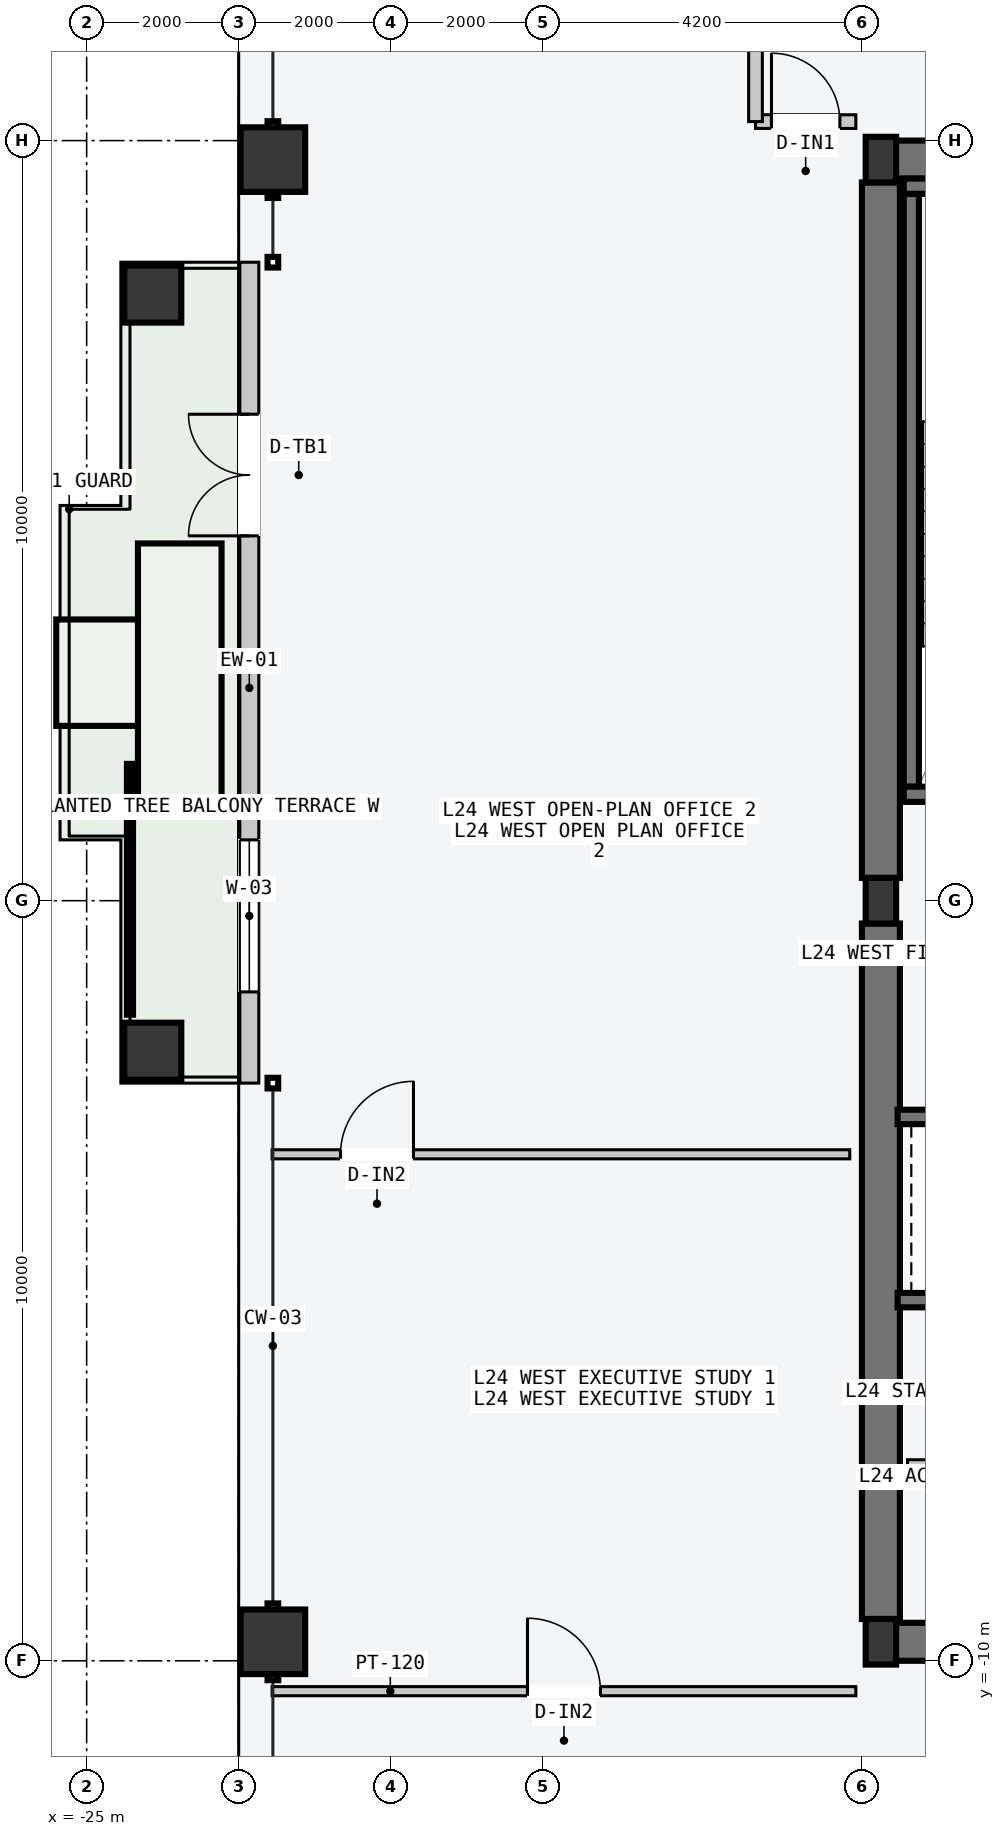
"""IFC4 building model, lengths in metres.
Left out: names, types, materials, properties, quantities, classifications, styles, units other than length and angle.
Written with IfcOpenShell. Run it as: python <this file> out.ifc"""

import sys

from ifc_helpers import new_model, si_unit, direction, frame, frame_2d, origin, origin_2d, place, context, subcontext, project, spatial, rectangle, hollow_rectangle, i_section, extrude, element, fill, save


model = new_model("IFC4")
c1 = context("Model", 3, precision=1e-05, world=origin(), true_north=direction((0.0, 1.0)))
c2 = subcontext(c1, "Body", "Model", "MODEL_VIEW")
j1 = project(units=[si_unit("LENGTHUNIT", "METRE"), si_unit("PLANEANGLEUNIT", "RADIAN")], contexts=[c1])
p1 = place(None, origin())
s1 = spatial("IfcSite", under=j1, at=p1, CompositionType="ELEMENT")
p2 = place(p1, origin())
s2 = spatial("IfcBuilding", under=s1, at=p2, CompositionType="ELEMENT")
p3 = place(p2, frame((0.0, 0.0, 95.4)))
s3 = spatial("IfcBuildingStorey", under=s2, at=p3, CompositionType="ELEMENT", Elevation=95.4)
for number, where, z_axis, x_axis in (
    (1, (-14.53, -9.75, -0.2), (0.0, 0.0, 1.0), (1.0, 0.0, 0.0)),
    (2, (-14.53, 9.75, -0.2), (0.0, 0.0, 1.0), (1.0, 0.0, 0.0)),
):
    element("IfcWall", number, at=place(p3, frame(where, z_axis=z_axis, x_axis=x_axis)), inside=s3, PredefinedType="SHEAR", context=c2, shape_type="SweptSolid", body=[
        extrude(rectangle(XDim=6.46, YDim=0.5, at=frame_2d((3.23, 0.0))), origin(), (0.0, 0.0, 1.0), 3.6),
    ])
for number, where, z_axis, x_axis in (
    (3, (-14.55, -9.45, -0.2), (0.0, 0.0, 1.0), (0.0, 1.0, 0.0)),
    (4, (-14.55, 0.3, -0.2), (0.0, 0.0, 1.0), (0.0, 1.0, 0.0)),
):
    element("IfcWall", number, at=place(p3, frame(where, z_axis=z_axis, x_axis=x_axis)), inside=s3, PredefinedType="SHEAR", context=c2, shape_type="SweptSolid", body=[
        extrude(rectangle(XDim=9.15, YDim=0.5, at=frame_2d((4.575, 0.0))), origin(), (0.0, 0.0, 1.0), 3.6),
    ])
p4 = place(p3, frame((-14.15, 1.5, -0.2), z_axis=(0.0, 0.0, 1.0), x_axis=(0.0, 1.0, 0.0)))
e5 = element("IfcWall", 5, at=p4, inside=s3, PredefinedType="SOLIDWALL", context=c2, shape_type="SweptSolid", body=[
    extrude(rectangle(XDim=7.8, YDim=0.2, at=frame_2d((3.9, 0.0))), origin(), (0.0, 0.0, 1.0), 3.6),
])
p5 = place(p3, frame((-14.25, 1.4, -0.2), z_axis=(0.0, 0.0, 1.0), x_axis=(1.0, 0.0, 0.0)))
e6 = element("IfcWall", 6, at=p5, inside=s3, PredefinedType="SOLIDWALL", context=c2, shape_type="SweptSolid", body=[
    extrude(rectangle(XDim=3.72, YDim=0.2, at=frame_2d((1.86, 0.0))), origin(), (0.0, 0.0, 1.0), 3.6),
])
p6 = place(p5, frame((1.5, 0.0, 0.2)))
e7 = element("IfcOpeningElement", 7, at=p6, cuts=e6, PredefinedType="OPENING", context=c2, shape_type="SweptSolid", body=[
    extrude(rectangle(XDim=1.12, YDim=2.18, at=frame_2d((0.56, 1.09))), frame((0.0, 0.11, 0.0), z_axis=(0.0, -1.0, 0.0), x_axis=(1.0, 0.0, 0.0)), (0.0, 0.0, 1.0), 0.22),
])
p7 = place(p3, frame((-14.25, 9.4, -0.2), z_axis=(0.0, 0.0, 1.0), x_axis=(1.0, 0.0, 0.0)))
e8 = element("IfcWall", 8, at=p7, inside=s3, PredefinedType="SOLIDWALL", context=c2, shape_type="SweptSolid", body=[
    extrude(rectangle(XDim=3.72, YDim=0.2, at=frame_2d((1.86, 0.0))), origin(), (0.0, 0.0, 1.0), 3.6),
])
for number, where, z_axis, x_axis in (
    (9, (-14.55, -9.75, 0.0), (0.0, 0.0, 1.0), (1.0, 0.0, 0.0)),
    (10, (-14.55, 0.0, 0.0), (0.0, 0.0, 1.0), (1.0, 0.0, 0.0)),
    (11, (-14.55, 9.75, 0.0), (0.0, 0.0, 1.0), (1.0, 0.0, 0.0)),
):
    element("IfcColumn", number, at=place(p3, frame(where, z_axis=z_axis, x_axis=x_axis)), inside=s3, PredefinedType="COLUMN", context=c2, shape_type="SweptSolid", body=[
        extrude(i_section(OverallWidth=0.4, OverallDepth=0.6, WebThickness=0.022, FlangeThickness=0.036, at=origin_2d()), origin(), (0.0, 0.0, 1.0), 3.6),
    ])
for number, where, z_axis, x_axis in (
    (12, (-22.55, -9.75, 0.0), (0.0, 0.0, 1.0), (0.0, 1.0, 0.0)),
    (13, (-22.55, 9.75, 0.0), (0.0, 0.0, 1.0), (0.0, 1.0, 0.0)),
):
    element("IfcColumn", number, at=place(p3, frame(where, z_axis=z_axis, x_axis=x_axis)), inside=s3, PredefinedType="COLUMN", context=c2, shape_type="SweptSolid", body=[
        extrude(hollow_rectangle(XDim=0.85, YDim=0.85, WallThickness=0.04, at=origin_2d()), origin(), (0.0, 0.0, 1.0), 3.6),
    ])
for number, where, z_axis, x_axis in (
    (14, (-24.13, -1.98, -0.2), (0.0, 0.0, 1.0), (0.0, 1.0, 0.0)),
    (15, (-24.13, 7.98, -0.2), (0.0, 0.0, 1.0), (0.0, 1.0, 0.0)),
):
    element("IfcColumn", number, at=place(p3, frame(where, z_axis=z_axis, x_axis=x_axis)), inside=s3, PredefinedType="COLUMN", context=c2, shape_type="SweptSolid", body=[
        extrude(hollow_rectangle(XDim=0.75, YDim=0.75, WallThickness=0.032, at=origin_2d()), origin(), (0.0, 0.0, 1.0), 3.8),
    ])
p8 = place(p3, frame((-22.86, -2.4, 0.0), z_axis=(0.0, 0.0, 1.0), x_axis=(0.0, 1.0, 0.0)))
e16 = element("IfcWall", 16, at=p8, inside=s3, PredefinedType="STANDARD", context=c2, shape_type="SweptSolid", body=[
    extrude(rectangle(XDim=10.8, YDim=0.25, at=frame_2d((5.4, 0.0))), origin(), (0.0, 0.0, 1.0), 3.4),
])
p9 = place(p8, frame((7.2, 0.0, 0.0)))
e17 = element("IfcOpeningElement", 17, at=p9, cuts=e16, PredefinedType="OPENING", context=c2, shape_type="SweptSolid", body=[
    extrude(rectangle(XDim=1.6, YDim=2.2, at=frame_2d((0.8, 1.1))), frame((0.0, 0.135, 0.0), z_axis=(0.0, -1.0, 0.0), x_axis=(1.0, 0.0, 0.0)), (0.0, 0.0, 1.0), 0.27),
])
p10 = place(p8, frame((1.2, 0.0, 0.85)))
e18 = element("IfcOpeningElement", 18, at=p10, cuts=e16, PredefinedType="OPENING", context=c2, shape_type="SweptSolid", body=[
    extrude(rectangle(XDim=2.0, YDim=2.1, at=frame_2d((1.0, 1.05))), frame((0.0, 0.135, 0.0), z_axis=(0.0, -1.0, 0.0), x_axis=(1.0, 0.0, 0.0)), (0.0, 0.0, 1.0), 0.27),
])
p11 = place(p3, frame((-14.33, -2.845, -0.2), z_axis=(0.0, 0.0, 1.0), x_axis=(1.0, 0.0, 0.0)))
e19 = element("IfcWall", 19, at=p11, inside=s3, PredefinedType="SOLIDWALL", context=c2, shape_type="SweptSolid", body=[
    extrude(rectangle(XDim=2.68, YDim=0.19, at=frame_2d((1.34, 0.0))), origin(), (0.0, 0.0, 1.0), 3.6),
])
p12 = place(p11, frame((0.83, 0.0, 0.2)))
e20 = element("IfcOpeningElement", 20, at=p12, cuts=e19, PredefinedType="OPENING", context=c2, shape_type="SweptSolid", body=[
    extrude(rectangle(XDim=1.2, YDim=2.2, at=frame_2d((0.6, 1.1))), frame((0.0, 0.105, 0.0), z_axis=(0.0, -1.0, 0.0), x_axis=(1.0, 0.0, 0.0)), (0.0, 0.0, 1.0), 0.21),
])
p13 = place(p3, frame((-14.33, -5.255, -0.2), z_axis=(0.0, 0.0, 1.0), x_axis=(1.0, 0.0, 0.0)))
e21 = element("IfcWall", 21, at=p13, inside=s3, PredefinedType="SOLIDWALL", context=c2, shape_type="SweptSolid", body=[
    extrude(rectangle(XDim=2.68, YDim=0.19, at=frame_2d((1.34, 0.0))), origin(), (0.0, 0.0, 1.0), 3.6),
])
p14 = place(p3, frame((-11.7, -7.425, 0.0), z_axis=(0.0, 0.0, 1.0), x_axis=(-1.0, 0.0, 0.0)))
e22 = element("IfcWall", 22, at=p14, inside=s3, PredefinedType="PARTITIONING", context=c2, shape_type="SweptSolid", body=[
    extrude(rectangle(XDim=2.5, YDim=0.14, at=frame_2d((1.25, 0.0))), origin(), (0.0, 0.0, 1.0), 3.4),
])
p15 = place(p3, frame((-22.56, -10.4, 0.0), z_axis=(0.0, 0.0, 1.0), x_axis=(1.0, 0.0, 0.0)))
e23 = element("IfcWall", 23, at=p15, inside=s3, PredefinedType="PARTITIONING", context=c2, shape_type="SweptSolid", body=[
    extrude(rectangle(XDim=7.68, YDim=0.12, at=frame_2d((3.84, 0.0))), origin(), (0.0, 0.0, 1.0), 3.4),
])
p16 = place(p15, frame((3.36, 0.0, 0.0)))
e24 = element("IfcOpeningElement", 24, at=p16, cuts=e23, PredefinedType="OPENING", context=c2, shape_type="SweptSolid", body=[
    extrude(rectangle(XDim=0.96, YDim=2.18, at=frame_2d((0.48, 1.09))), frame((0.0, 0.07, 0.0), z_axis=(0.0, -1.0, 0.0), x_axis=(1.0, 0.0, 0.0)), (0.0, 0.0, 1.0), 0.14),
])
p17 = place(p3, frame((-16.2, 10.25, 0.0), z_axis=(0.0, 0.0, 1.0), x_axis=(1.0, 0.0, 0.0)))
e25 = element("IfcWall", 25, at=p17, inside=s3, PredefinedType="PARTITIONING", context=c2, shape_type="SweptSolid", body=[
    extrude(rectangle(XDim=1.32, YDim=0.18, at=frame_2d((0.66, 0.0))), origin(), (0.0, 0.0, 1.0), 3.4),
])
p18 = place(p17, frame((0.21, 0.0, 0.0)))
e26 = element("IfcOpeningElement", 26, at=p18, cuts=e25, PredefinedType="OPENING", context=c2, shape_type="SweptSolid", body=[
    extrude(rectangle(XDim=0.9, YDim=2.15, at=frame_2d((0.45, 1.075))), frame((0.0, 0.1, 0.0), z_axis=(0.0, -1.0, 0.0), x_axis=(1.0, 0.0, 0.0)), (0.0, 0.0, 1.0), 0.2),
])
p19 = place(p3, frame((-16.2, 10.25, 0.0), z_axis=(0.0, 0.0, 1.0), x_axis=(0.0, 1.0, 0.0)))
e27 = element("IfcWall", 27, at=p19, inside=s3, PredefinedType="PARTITIONING", context=c2, shape_type="SweptSolid", body=[
    extrude(rectangle(XDim=1.95, YDim=0.18, at=frame_2d((0.975, 0.0))), origin(), (0.0, 0.0, 1.0), 3.4),
])
p20 = place(p3, frame((-22.56, -3.336, 0.0), z_axis=(0.0, 0.0, 1.0), x_axis=(1.0, 0.0, 0.0)))
e28 = element("IfcWall", 28, at=p20, inside=s3, PredefinedType="PARTITIONING", context=c2, shape_type="SweptSolid", body=[
    extrude(rectangle(XDim=7.6, YDim=0.12, at=frame_2d((3.8, 0.0))), origin(), (0.0, 0.0, 1.0), 3.0),
])
p21 = place(p20, frame((0.9, 0.0, 0.0)))
e29 = element("IfcOpeningElement", 29, at=p21, cuts=e28, PredefinedType="OPENING", context=c2, shape_type="SweptSolid", body=[
    extrude(rectangle(XDim=0.96, YDim=2.18, at=frame_2d((0.48, 1.09))), frame((0.0, 0.07, 0.0), z_axis=(0.0, -1.0, 0.0), x_axis=(1.0, 0.0, 0.0)), (0.0, 0.0, 1.0), 0.14),
])
p22 = place(p9, origin())
e30 = element("IfcDoor", 30, at=p22, inside=s3, OperationType="DOUBLE_DOOR_SINGLE_SWING", PredefinedType="DOOR", context=c2, shape_type="SweptSolid", body=[
    extrude(rectangle(XDim=1.6, YDim=2.2, at=frame_2d((0.8, 1.1))), frame((0.0, 0.025, 0.0), z_axis=(0.0, -1.0, 0.0), x_axis=(1.0, 0.0, 0.0)), (0.0, 0.0, 1.0), 0.05),
])
fill(e17, e30)
p23 = place(p10, origin())
e31 = element("IfcWindow", 31, at=p23, inside=s3, PartitioningType="SINGLE_PANEL", PredefinedType="WINDOW", context=c2, shape_type="SweptSolid", body=[
    extrude(rectangle(XDim=2.0, YDim=2.1, at=frame_2d((1.0, 1.05))), frame((0.0, 0.03, 0.0), z_axis=(0.0, -1.0, 0.0), x_axis=(1.0, 0.0, 0.0)), (0.0, 0.0, 1.0), 0.06),
])
fill(e18, e31)
p24 = place(p16, origin())
e32 = element("IfcDoor", 32, at=p24, inside=s3, OperationType="SINGLE_SWING_LEFT", PredefinedType="DOOR", context=c2, shape_type="SweptSolid", body=[
    extrude(rectangle(XDim=0.96, YDim=2.18, at=frame_2d((0.48, 1.09))), frame((0.0, 0.025, 0.0), z_axis=(0.0, -1.0, 0.0), x_axis=(1.0, 0.0, 0.0)), (0.0, 0.0, 1.0), 0.05),
])
fill(e24, e32)
p25 = place(p18, origin())
e33 = element("IfcDoor", 33, at=p25, inside=s3, OperationType="SINGLE_SWING_LEFT", PredefinedType="DOOR", context=c2, shape_type="SweptSolid", body=[
    extrude(rectangle(XDim=0.9, YDim=2.15, at=frame_2d((0.45, 1.075))), frame((0.0, 0.025, 0.0), z_axis=(0.0, -1.0, 0.0), x_axis=(1.0, 0.0, 0.0)), (0.0, 0.0, 1.0), 0.05),
])
fill(e26, e33)
p26 = place(p21, origin())
e34 = element("IfcDoor", 34, at=p26, inside=s3, OperationType="SINGLE_SWING_RIGHT", PredefinedType="DOOR", context=c2, shape_type="SweptSolid", body=[
    extrude(rectangle(XDim=0.96, YDim=2.18, at=frame_2d((0.48, 1.09))), frame((0.0, 0.025, 0.0), z_axis=(0.0, -1.0, 0.0), x_axis=(1.0, 0.0, 0.0)), (0.0, 0.0, 1.0), 0.05),
])
fill(e29, e34)
save(model, sys.argv[1])
